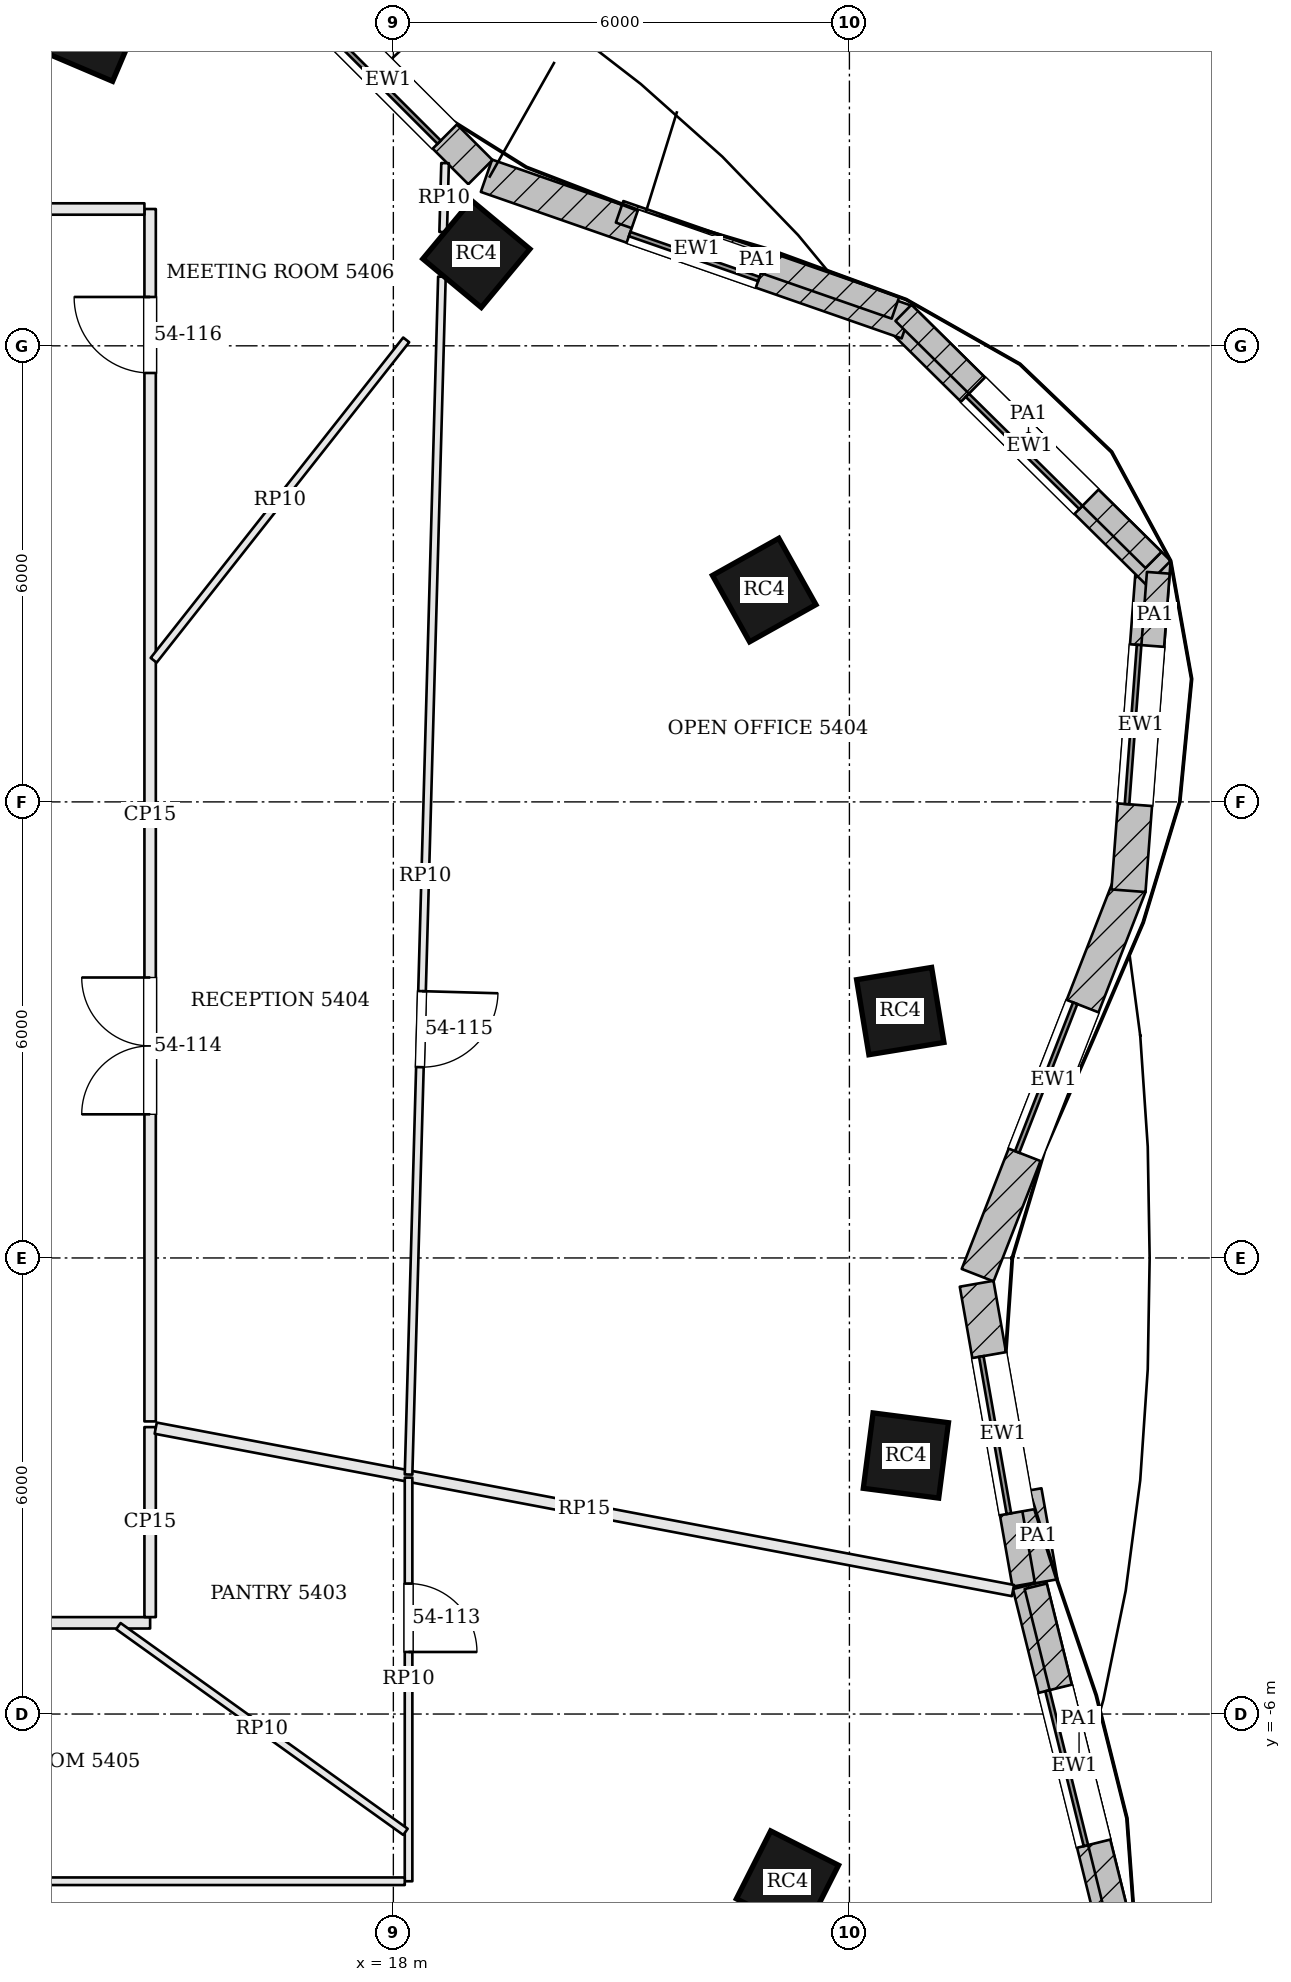
"""IFC4 building model, lengths in metres.
Left out: names, types, materials, properties, quantities, classifications, styles, units other than length and angle.
Written with IfcOpenShell. Run it as: python <this file> out.ifc"""

import sys

from ifc_helpers import new_model, si_unit, direction, frame, frame_2d, origin, origin_2d, place, context, subcontext, project, spatial, rectangle, extrude, element, fill, save


model = new_model("IFC4")
c1 = context("Model", 3, precision=1e-05, world=origin(), true_north=direction((0.0, 1.0)))
c2 = subcontext(c1, "Body", "Model", "MODEL_VIEW")
j1 = project(units=[si_unit("LENGTHUNIT", "METRE"), si_unit("PLANEANGLEUNIT", "RADIAN")], contexts=[c1])
p1 = place(None, origin())
s1 = spatial("IfcSite", under=j1, at=p1, CompositionType="ELEMENT")
p2 = place(p1, origin())
s2 = spatial("IfcBuilding", under=s1, at=p2, CompositionType="ELEMENT")
p3 = place(p2, frame((0.0, 0.0, 221.4)))
s3 = spatial("IfcBuildingStorey", under=s2, at=p3, CompositionType="ELEMENT", Elevation=221.4)
for number, where, z_axis, x_axis in (
    (1, (24.669, 3.248, 0.0), (0.0, 0.0, 1.0), (-0.162, 0.987, 0.0)),
    (2, (22.879, 8.787, 0.0), (0.0, 0.0, 1.0), (-0.489, 0.873, 0.0)),
    (3, (19.092, 13.209, 0.0), (0.0, 0.0, 1.0), (-0.769, 0.639, 0.0)),
    (4, (14.042, 16.136, 0.0), (0.0, 0.0, 1.0), (-0.92, 0.392, 0.0)),
    (5, (23.185, -8.21, 0.0), (0.0, 0.0, 1.0), (0.451, 0.893, 0.0)),
    (6, (24.743, -2.599, 0.0), (0.0, 0.0, 1.0), (0.128, 0.992, 0.0)),
):
    element("IfcColumn", number, at=place(p3, frame(where, z_axis=z_axis, x_axis=x_axis)), inside=s3, PredefinedType="COLUMN", context=c2, shape_type="SweptSolid", body=[
        extrude(rectangle(XDim=1.0, YDim=1.0, at=origin_2d()), origin(), (0.0, 0.0, 1.0), 3.9),
    ])
p4 = place(p3, frame((25.687, -0.226, 0.0), z_axis=(0.0, 0.0, 1.0), x_axis=(0.363500194409, 0.931594122279, 0.0)))
e7 = element("IfcWall", 7, at=p4, inside=s3, PredefinedType="SOLIDWALL", context=c2, shape_type="SweptSolid", body=[
    extrude(rectangle(XDim=5.499, YDim=0.45, at=frame_2d((2.75, 0.0))), origin(), (0.0, 0.0, 1.0), 3.7),
])
p5 = place(p4, frame((1.699, 0.0, 0.9)))
e8 = element("IfcOpeningElement", 8, at=p5, cuts=e7, PredefinedType="OPENING", context=c2, shape_type="SweptSolid", body=[
    extrude(rectangle(XDim=2.1, YDim=2.3, at=frame_2d((1.05, 1.15))), frame((0.0, 0.235, 0.0), z_axis=(0.0, -1.0, 0.0), x_axis=(1.0, 0.0, 0.0)), (0.0, 0.0, 1.0), 0.47),
])
p6 = place(p3, frame((27.671, 4.831, 0.0), z_axis=(0.0, 0.0, 1.0), x_axis=(0.075658122047, 0.997133816781, 0.0)))
e9 = element("IfcWall", 9, at=p6, inside=s3, PredefinedType="SOLIDWALL", context=c2, shape_type="SweptSolid", body=[
    extrude(rectangle(XDim=4.369, YDim=0.45, at=frame_2d((2.185, 0.0))), origin(), (0.0, 0.0, 1.0), 3.7),
])
p7 = place(p6, frame((1.135, 0.0, 0.9)))
e10 = element("IfcOpeningElement", 10, at=p7, cuts=e9, PredefinedType="OPENING", context=c2, shape_type="SweptSolid", body=[
    extrude(rectangle(XDim=2.1, YDim=2.3, at=frame_2d((1.05, 1.15))), frame((0.0, 0.235, 0.0), z_axis=(0.0, -1.0, 0.0), x_axis=(1.0, 0.0, 0.0)), (0.0, 0.0, 1.0), 0.47),
])
p8 = place(p3, frame((28.068, 9.011, 0.0), z_axis=(0.0, 0.0, 1.0), x_axis=(-0.711293453435, 0.702895172199, 0.0)))
e11 = element("IfcWall", 11, at=p8, inside=s3, PredefinedType="SOLIDWALL", context=c2, shape_type="SweptSolid", body=[
    extrude(rectangle(XDim=4.768, YDim=0.45, at=frame_2d((2.384, 0.0))), origin(), (0.0, 0.0, 1.0), 3.7),
])
p9 = place(p8, frame((1.334, 0.0, 0.9)))
e12 = element("IfcOpeningElement", 12, at=p9, cuts=e11, PredefinedType="OPENING", context=c2, shape_type="SweptSolid", body=[
    extrude(rectangle(XDim=2.1, YDim=2.3, at=frame_2d((1.05, 1.15))), frame((0.0, 0.235, 0.0), z_axis=(0.0, -1.0, 0.0), x_axis=(1.0, 0.0, 0.0)), (0.0, 0.0, 1.0), 0.47),
])
p10 = place(p3, frame((24.761, 12.31, 0.0), z_axis=(0.0, 0.0, 1.0), x_axis=(-0.944397305248, 0.328806523414, 0.0)))
e13 = element("IfcWall", 13, at=p10, inside=s3, PredefinedType="SOLIDWALL", context=c2, shape_type="SweptSolid", body=[
    extrude(rectangle(XDim=5.862, YDim=0.45, at=frame_2d((2.931, 0.0))), origin(), (0.0, 0.0, 1.0), 3.7),
])
p11 = place(p10, frame((2.031, 0.0, 0.9)))
e14 = element("IfcOpeningElement", 14, at=p11, cuts=e13, PredefinedType="OPENING", context=c2, shape_type="SweptSolid", body=[
    extrude(rectangle(XDim=1.8, YDim=2.3, at=frame_2d((0.9, 1.15))), frame((0.0, 0.235, 0.0), z_axis=(0.0, -1.0, 0.0), x_axis=(1.0, 0.0, 0.0)), (0.0, 0.0, 1.0), 0.47),
])
p12 = place(p3, frame((19.145, 14.285, 0.0), z_axis=(0.0, 0.0, 1.0), x_axis=(-0.707427521052, 0.706785895769, 0.0)))
e15 = element("IfcWall", 15, at=p12, inside=s3, PredefinedType="SOLIDWALL", context=c2, shape_type="SweptSolid", body=[
    extrude(rectangle(XDim=3.425, YDim=0.45, at=frame_2d((1.712, 0.0))), origin(), (0.0, 0.0, 1.0), 3.7),
])
p13 = place(p12, frame((0.662, 0.0, 0.9)))
e16 = element("IfcOpeningElement", 16, at=p13, cuts=e15, PredefinedType="OPENING", context=c2, shape_type="SweptSolid", body=[
    extrude(rectangle(XDim=2.1, YDim=2.3, at=frame_2d((1.05, 1.15))), frame((0.0, 0.235, 0.0), z_axis=(0.0, -1.0, 0.0), x_axis=(1.0, 0.0, 0.0)), (0.0, 0.0, 1.0), 0.47),
])
p14 = place(p3, frame((27.552, -9.072, 0.0), z_axis=(0.0, 0.0, 1.0), x_axis=(-0.240629941406, 0.970616933347, 0.0)))
e17 = element("IfcWall", 17, at=p14, inside=s3, PredefinedType="SOLIDWALL", context=c2, shape_type="SweptSolid", body=[
    extrude(rectangle(XDim=4.915, YDim=0.45, at=frame_2d((2.457, 0.0))), origin(), (0.0, 0.0, 1.0), 3.7),
])
p15 = place(p14, frame((1.407, 0.0, 0.9)))
e18 = element("IfcOpeningElement", 18, at=p15, cuts=e17, PredefinedType="OPENING", context=c2, shape_type="SweptSolid", body=[
    extrude(rectangle(XDim=2.1, YDim=2.3, at=frame_2d((1.05, 1.15))), frame((0.0, 0.235, 0.0), z_axis=(0.0, -1.0, 0.0), x_axis=(1.0, 0.0, 0.0)), (0.0, 0.0, 1.0), 0.47),
])
p16 = place(p3, frame((26.366, -4.285, 0.0), z_axis=(0.0, 0.0, 1.0), x_axis=(-0.172902168926, 0.984939003178, 0.0)))
e19 = element("IfcWall", 19, at=p16, inside=s3, PredefinedType="SOLIDWALL", context=c2, shape_type="SweptSolid", body=[
    extrude(rectangle(XDim=4.006, YDim=0.45, at=frame_2d((2.003, 0.0))), origin(), (0.0, 0.0, 1.0), 3.7),
])
p17 = place(p16, frame((0.953, 0.0, 0.9)))
e20 = element("IfcOpeningElement", 20, at=p17, cuts=e19, PredefinedType="OPENING", context=c2, shape_type="SweptSolid", body=[
    extrude(rectangle(XDim=2.1, YDim=2.3, at=frame_2d((1.05, 1.15))), frame((0.0, 0.235, 0.0), z_axis=(0.0, -1.0, 0.0), x_axis=(1.0, 0.0, 0.0)), (0.0, 0.0, 1.0), 0.47),
])
p18 = place(p3, frame((27.979, 7.892, 3.9), z_axis=(0.0, 0.0, 1.0), x_axis=(0.075750382553, 0.997126812167, 0.0)))
e21 = element("IfcWall", 21, at=p18, inside=s3, PredefinedType="PARAPET", context=c2, shape_type="SweptSolid", body=[
    extrude(rectangle(XDim=1.125, YDim=0.3, at=frame_2d((0.562, 0.0))), origin(), (0.0, 0.0, 1.0), 1.1),
])
p19 = place(p3, frame((28.0, 9.183, 3.9), z_axis=(0.0, 0.0, 1.0), x_axis=(-0.711291435321, 0.702897214419, 0.0)))
e22 = element("IfcWall", 22, at=p19, inside=s3, PredefinedType="PARAPET", context=c2, shape_type="SweptSolid", body=[
    extrude(rectangle(XDim=4.625, YDim=0.3, at=frame_2d((2.312, 0.0))), origin(), (0.0, 0.0, 1.0), 1.1),
])
p20 = place(p3, frame((24.605, 12.5, 3.9), z_axis=(0.0, 0.0, 1.0), x_axis=(-0.944373295981, 0.328875474668, 0.0)))
e23 = element("IfcWall", 23, at=p20, inside=s3, PredefinedType="PARAPET", context=c2, shape_type="SweptSolid", body=[
    extrude(rectangle(XDim=3.842, YDim=0.3, at=frame_2d((1.921, 0.0))), origin(), (0.0, 0.0, 1.0), 1.1),
])
p21 = place(p3, frame((27.592, -8.921, 3.9), z_axis=(0.0, 0.0, 1.0), x_axis=(-0.240669381496, 0.970607154729, 0.0)))
e24 = element("IfcWall", 24, at=p21, inside=s3, PredefinedType="PARAPET", context=c2, shape_type="SweptSolid", body=[
    extrude(rectangle(XDim=4.741, YDim=0.3, at=frame_2d((2.371, 0.0))), origin(), (0.0, 0.0, 1.0), 1.1),
])
p22 = place(p3, frame((26.589, -4.254, 3.9), z_axis=(0.0, 0.0, 1.0), x_axis=(-0.172857566704, 0.984946831881, 0.0)))
e25 = element("IfcWall", 25, at=p22, inside=s3, PredefinedType="PARAPET", context=c2, shape_type="SweptSolid", body=[
    extrude(rectangle(XDim=1.216, YDim=0.3, at=frame_2d((0.608, 0.0))), origin(), (0.0, 0.0, 1.0), 1.1),
])
p23 = place(p3, frame((0.265, -4.8, 0.0), z_axis=(0.0, 0.0, 1.0), x_axis=(1.0, 0.0, 0.0)))
e26 = element("IfcWall", 26, at=p23, inside=s3, PredefinedType="PARTITIONING", context=c2, shape_type="SweptSolid", body=[
    extrude(rectangle(XDim=14.535, YDim=0.15, at=frame_2d((7.268, 0.0))), origin(), (0.0, 0.0, 1.0), 3.084),
])
p24 = place(p23, frame((1.425, 0.0, 0.0)))
e27 = element("IfcOpeningElement", 27, at=p24, cuts=e26, PredefinedType="OPENING", context=c2, shape_type="SweptSolid", body=[
    extrude(rectangle(XDim=1.8, YDim=2.1, at=frame_2d((0.9, 1.05))), frame((0.0, 0.085, 0.0), z_axis=(0.0, -1.0, 0.0), x_axis=(1.0, 0.0, 0.0)), (0.0, 0.0, 1.0), 0.17),
])
p25 = place(p23, frame((6.872, 0.0, 0.0)))
e28 = element("IfcOpeningElement", 28, at=p25, cuts=e26, PredefinedType="OPENING", context=c2, shape_type="SweptSolid", body=[
    extrude(rectangle(XDim=1.0, YDim=2.4, at=frame_2d((0.5, 1.2))), frame((0.0, 0.085, 0.0), z_axis=(0.0, -1.0, 0.0), x_axis=(1.0, 0.0, 0.0)), (0.0, 0.0, 1.0), 0.17),
])
p26 = place(p23, frame((11.538, 0.0, 0.0)))
e29 = element("IfcOpeningElement", 29, at=p26, cuts=e26, PredefinedType="OPENING", context=c2, shape_type="SweptSolid", body=[
    extrude(rectangle(XDim=1.0, YDim=2.4, at=frame_2d((0.5, 1.2))), frame((0.0, 0.085, 0.0), z_axis=(0.0, -1.0, 0.0), x_axis=(1.0, 0.0, 0.0)), (0.0, 0.0, 1.0), 0.17),
])
p27 = place(p3, frame((14.8, -4.725, 0.0), z_axis=(0.0, 0.0, 1.0), x_axis=(0.0, 1.0, 0.0)))
e30 = element("IfcWall", 30, at=p27, inside=s3, PredefinedType="PARTITIONING", context=c2, shape_type="SweptSolid", body=[
    extrude(rectangle(XDim=2.5, YDim=0.15, at=frame_2d((1.25, 0.0))), origin(), (0.0, 0.0, 1.0), 3.084),
])
p28 = place(p3, frame((26.152, -4.376, 0.0), z_axis=(0.0, 0.0, 1.0), x_axis=(-0.982525172823, 0.186129752508, 0.0)))
e31 = element("IfcWall", 31, at=p28, inside=s3, PredefinedType="PARTITIONING", context=c2, shape_type="SweptSolid", body=[
    extrude(rectangle(XDim=11.479, YDim=0.15, at=frame_2d((5.739, 0.0))), origin(), (0.0, 0.0, 1.0), 3.234),
])
p29 = place(p3, frame((14.8, -2.15, 0.0), z_axis=(0.0, 0.0, 1.0), x_axis=(0.0, 1.0, 0.0)))
e32 = element("IfcWall", 32, at=p29, inside=s3, PredefinedType="PARTITIONING", context=c2, shape_type="SweptSolid", body=[
    extrude(rectangle(XDim=15.95, YDim=0.15, at=frame_2d((7.975, 0.0))), origin(), (0.0, 0.0, 1.0), 3.084),
])
p30 = place(p29, frame((4.04, 0.0, 0.0)))
e33 = element("IfcOpeningElement", 33, at=p30, cuts=e32, PredefinedType="OPENING", context=c2, shape_type="SweptSolid", body=[
    extrude(rectangle(XDim=1.8, YDim=2.1, at=frame_2d((0.9, 1.05))), frame((0.0, 0.085, 0.0), z_axis=(0.0, -1.0, 0.0), x_axis=(1.0, 0.0, 0.0)), (0.0, 0.0, 1.0), 0.17),
])
p31 = place(p29, frame((13.793, 0.0, 0.0)))
e34 = element("IfcOpeningElement", 34, at=p31, cuts=e32, PredefinedType="OPENING", context=c2, shape_type="SweptSolid", body=[
    extrude(rectangle(XDim=1.0, YDim=2.4, at=frame_2d((0.5, 1.2))), frame((0.0, 0.085, 0.0), z_axis=(0.0, -1.0, 0.0), x_axis=(1.0, 0.0, 0.0)), (0.0, 0.0, 1.0), 0.17),
])
p32 = place(p3, frame((14.725, 13.8, 0.0), z_axis=(0.0, 0.0, 1.0), x_axis=(-1.0, 0.0, 0.0)))
e35 = element("IfcWall", 35, at=p32, inside=s3, PredefinedType="PARTITIONING", context=c2, shape_type="SweptSolid", body=[
    extrude(rectangle(XDim=8.511, YDim=0.15, at=frame_2d((4.255, 0.0))), origin(), (0.0, 0.0, 1.0), 3.084),
])
p33 = place(p32, frame((4.95, 0.0, 0.0)))
e36 = element("IfcOpeningElement", 36, at=p33, cuts=e35, PredefinedType="OPENING", context=c2, shape_type="SweptSolid", body=[
    extrude(rectangle(XDim=1.0, YDim=2.1, at=frame_2d((0.5, 1.05))), frame((0.0, 0.085, 0.0), z_axis=(0.0, -1.0, 0.0), x_axis=(1.0, 0.0, 0.0)), (0.0, 0.0, 1.0), 0.17),
])
p34 = place(p3, frame((18.2, -2.89, 0.0), z_axis=(0.0, 0.0, 1.0), x_axis=(0.0, -1.0, 0.0)))
e37 = element("IfcWall", 37, at=p34, inside=s3, PredefinedType="PARTITIONING", context=c2, shape_type="SweptSolid", body=[
    extrude(rectangle(XDim=5.31, YDim=0.1, at=frame_2d((2.655, 0.0))), origin(), (0.0, 0.0, 1.0), 3.084),
])
p35 = place(p34, frame((1.394, 0.0, 0.0)))
e38 = element("IfcOpeningElement", 38, at=p35, cuts=e37, PredefinedType="OPENING", context=c2, shape_type="SweptSolid", body=[
    extrude(rectangle(XDim=0.9, YDim=2.1, at=frame_2d((0.45, 1.05))), frame((0.0, 0.06, 0.0), z_axis=(0.0, -1.0, 0.0), x_axis=(1.0, 0.0, 0.0)), (0.0, 0.0, 1.0), 0.12),
])
p36 = place(p3, frame((18.15, -8.2, 0.0), z_axis=(0.0, 0.0, 1.0), x_axis=(-1.0, 0.0, 0.0)))
e39 = element("IfcWall", 39, at=p36, inside=s3, PredefinedType="PARTITIONING", context=c2, shape_type="SweptSolid", body=[
    extrude(rectangle(XDim=17.932, YDim=0.1, at=frame_2d((8.966, 0.0))), origin(), (0.0, 0.0, 1.0), 3.084),
])
p37 = place(p36, frame((14.525, 0.0, 0.0)))
e40 = element("IfcOpeningElement", 40, at=p37, cuts=e39, PredefinedType="OPENING", context=c2, shape_type="SweptSolid", body=[
    extrude(rectangle(XDim=1.0, YDim=2.1, at=frame_2d((0.5, 1.05))), frame((0.0, 0.06, 0.0), z_axis=(0.0, -1.0, 0.0), x_axis=(1.0, 0.0, 0.0)), (0.0, 0.0, 1.0), 0.12),
])
p38 = place(p3, frame((14.382, -4.844, 0.0), z_axis=(0.0, 0.0, 1.0), x_axis=(0.812905436978, -0.582395699273, 0.0)))
e41 = element("IfcWall", 41, at=p38, inside=s3, PredefinedType="PARTITIONING", context=c2, shape_type="SweptSolid", body=[
    extrude(rectangle(XDim=4.646, YDim=0.1, at=frame_2d((2.323, 0.0))), origin(), (0.0, 0.0, 1.0), 3.084),
])
p39 = place(p3, frame((18.681, 14.404, 0.0), z_axis=(0.0, 0.0, 1.0), x_axis=(-0.027737168864, -0.999615250716, 0.0)))
e42 = element("IfcWall", 42, at=p39, inside=s3, PredefinedType="PARTITIONING", context=c2, shape_type="SweptSolid", body=[
    extrude(rectangle(XDim=0.906, YDim=0.1, at=frame_2d((0.453, 0.0))), origin(), (0.0, 0.0, 1.0), 3.084),
])
p40 = place(p3, frame((18.639, 12.909, 0.0), z_axis=(0.0, 0.0, 1.0), x_axis=(-0.027844870204, -0.999612256429, 0.0)))
e43 = element("IfcWall", 43, at=p40, inside=s3, PredefinedType="PARTITIONING", context=c2, shape_type="SweptSolid", body=[
    extrude(rectangle(XDim=15.765, YDim=0.1, at=frame_2d((7.882, 0.0))), origin(), (0.0, 0.0, 1.0), 3.084),
])
p41 = place(p40, frame((9.403, 0.0, 0.0)))
e44 = element("IfcOpeningElement", 44, at=p41, cuts=e43, PredefinedType="OPENING", context=c2, shape_type="SweptSolid", body=[
    extrude(rectangle(XDim=1.0, YDim=2.1, at=frame_2d((0.5, 1.05))), frame((0.0, 0.06, 0.0), z_axis=(0.0, -1.0, 0.0), x_axis=(1.0, 0.0, 0.0)), (0.0, 0.0, 1.0), 0.12),
])
p42 = place(p3, frame((14.846, 7.863, 0.0), z_axis=(0.0, 0.0, 1.0), x_axis=(0.619070377388, 0.785335512912, 0.0)))
e45 = element("IfcWall", 45, at=p42, inside=s3, PredefinedType="PARTITIONING", context=c2, shape_type="SweptSolid", body=[
    extrude(rectangle(XDim=5.367, YDim=0.1, at=frame_2d((2.684, 0.0))), origin(), (0.0, 0.0, 1.0), 3.084),
])
p43 = place(p5, origin())
e46 = element("IfcWindow", 46, at=p43, inside=s3, PartitioningType="SINGLE_PANEL", PredefinedType="WINDOW", context=c2, shape_type="SweptSolid", body=[
    extrude(rectangle(XDim=2.1, YDim=2.3, at=frame_2d((1.05, 1.15))), frame((0.0, 0.135, 0.0), z_axis=(0.0, -1.0, 0.0), x_axis=(1.0, 0.0, 0.0)), (0.0, 0.0, 1.0), 0.06),
])
fill(e8, e46)
p44 = place(p7, origin())
e47 = element("IfcWindow", 47, at=p44, inside=s3, PartitioningType="SINGLE_PANEL", PredefinedType="WINDOW", context=c2, shape_type="SweptSolid", body=[
    extrude(rectangle(XDim=2.1, YDim=2.3, at=frame_2d((1.05, 1.15))), frame((0.0, 0.135, 0.0), z_axis=(0.0, -1.0, 0.0), x_axis=(1.0, 0.0, 0.0)), (0.0, 0.0, 1.0), 0.06),
])
fill(e10, e47)
p45 = place(p9, origin())
e48 = element("IfcWindow", 48, at=p45, inside=s3, PartitioningType="SINGLE_PANEL", PredefinedType="WINDOW", context=c2, shape_type="SweptSolid", body=[
    extrude(rectangle(XDim=2.1, YDim=2.3, at=frame_2d((1.05, 1.15))), frame((0.0, 0.135, 0.0), z_axis=(0.0, -1.0, 0.0), x_axis=(1.0, 0.0, 0.0)), (0.0, 0.0, 1.0), 0.06),
])
fill(e12, e48)
p46 = place(p11, origin())
e49 = element("IfcWindow", 49, at=p46, inside=s3, PartitioningType="SINGLE_PANEL", PredefinedType="WINDOW", context=c2, shape_type="SweptSolid", body=[
    extrude(rectangle(XDim=1.8, YDim=2.3, at=frame_2d((0.9, 1.15))), frame((0.0, 0.135, 0.0), z_axis=(0.0, -1.0, 0.0), x_axis=(1.0, 0.0, 0.0)), (0.0, 0.0, 1.0), 0.06),
])
fill(e14, e49)
p47 = place(p13, origin())
e50 = element("IfcWindow", 50, at=p47, inside=s3, PartitioningType="SINGLE_PANEL", PredefinedType="WINDOW", context=c2, shape_type="SweptSolid", body=[
    extrude(rectangle(XDim=2.1, YDim=2.3, at=frame_2d((1.05, 1.15))), frame((0.0, 0.135, 0.0), z_axis=(0.0, -1.0, 0.0), x_axis=(1.0, 0.0, 0.0)), (0.0, 0.0, 1.0), 0.06),
])
fill(e16, e50)
p48 = place(p15, origin())
e51 = element("IfcWindow", 51, at=p48, inside=s3, PartitioningType="SINGLE_PANEL", PredefinedType="WINDOW", context=c2, shape_type="SweptSolid", body=[
    extrude(rectangle(XDim=2.1, YDim=2.3, at=frame_2d((1.05, 1.15))), frame((0.0, 0.135, 0.0), z_axis=(0.0, -1.0, 0.0), x_axis=(1.0, 0.0, 0.0)), (0.0, 0.0, 1.0), 0.06),
])
fill(e18, e51)
p49 = place(p17, origin())
e52 = element("IfcWindow", 52, at=p49, inside=s3, PartitioningType="SINGLE_PANEL", PredefinedType="WINDOW", context=c2, shape_type="SweptSolid", body=[
    extrude(rectangle(XDim=2.1, YDim=2.3, at=frame_2d((1.05, 1.15))), frame((0.0, 0.135, 0.0), z_axis=(0.0, -1.0, 0.0), x_axis=(1.0, 0.0, 0.0)), (0.0, 0.0, 1.0), 0.06),
])
fill(e20, e52)
p50 = place(p35, origin())
e53 = element("IfcDoor", 53, at=p50, inside=s3, OperationType="SINGLE_SWING_RIGHT", PredefinedType="DOOR", context=c2, shape_type="SweptSolid", body=[
    extrude(rectangle(XDim=0.9, YDim=2.1, at=frame_2d((0.45, 1.05))), frame((0.0, 0.025, 0.0), z_axis=(0.0, -1.0, 0.0), x_axis=(1.0, 0.0, 0.0)), (0.0, 0.0, 1.0), 0.05),
])
fill(e38, e53)
p51 = place(p30, origin())
e54 = element("IfcDoor", 54, at=p51, inside=s3, OperationType="DOUBLE_DOOR_SINGLE_SWING", PredefinedType="DOOR", context=c2, shape_type="SweptSolid", body=[
    extrude(rectangle(XDim=1.8, YDim=2.1, at=frame_2d((0.9, 1.05))), frame((0.0, 0.025, 0.0), z_axis=(0.0, -1.0, 0.0), x_axis=(1.0, 0.0, 0.0)), (0.0, 0.0, 1.0), 0.05),
])
fill(e33, e54)
p52 = place(p41, origin())
e55 = element("IfcDoor", 55, at=p52, inside=s3, OperationType="SINGLE_SWING_LEFT", PredefinedType="DOOR", context=c2, shape_type="SweptSolid", body=[
    extrude(rectangle(XDim=1.0, YDim=2.1, at=frame_2d((0.5, 1.05))), frame((0.0, 0.025, 0.0), z_axis=(0.0, -1.0, 0.0), x_axis=(1.0, 0.0, 0.0)), (0.0, 0.0, 1.0), 0.05),
])
fill(e44, e55)
p53 = place(p31, origin())
e56 = element("IfcDoor", 56, at=p53, inside=s3, OperationType="SINGLE_SWING_RIGHT", PredefinedType="DOOR", context=c2, shape_type="SweptSolid", body=[
    extrude(rectangle(XDim=1.0, YDim=2.4, at=frame_2d((0.5, 1.2))), frame((0.0, 0.025, 0.0), z_axis=(0.0, -1.0, 0.0), x_axis=(1.0, 0.0, 0.0)), (0.0, 0.0, 1.0), 0.05),
])
fill(e34, e56)
save(model, sys.argv[1])
